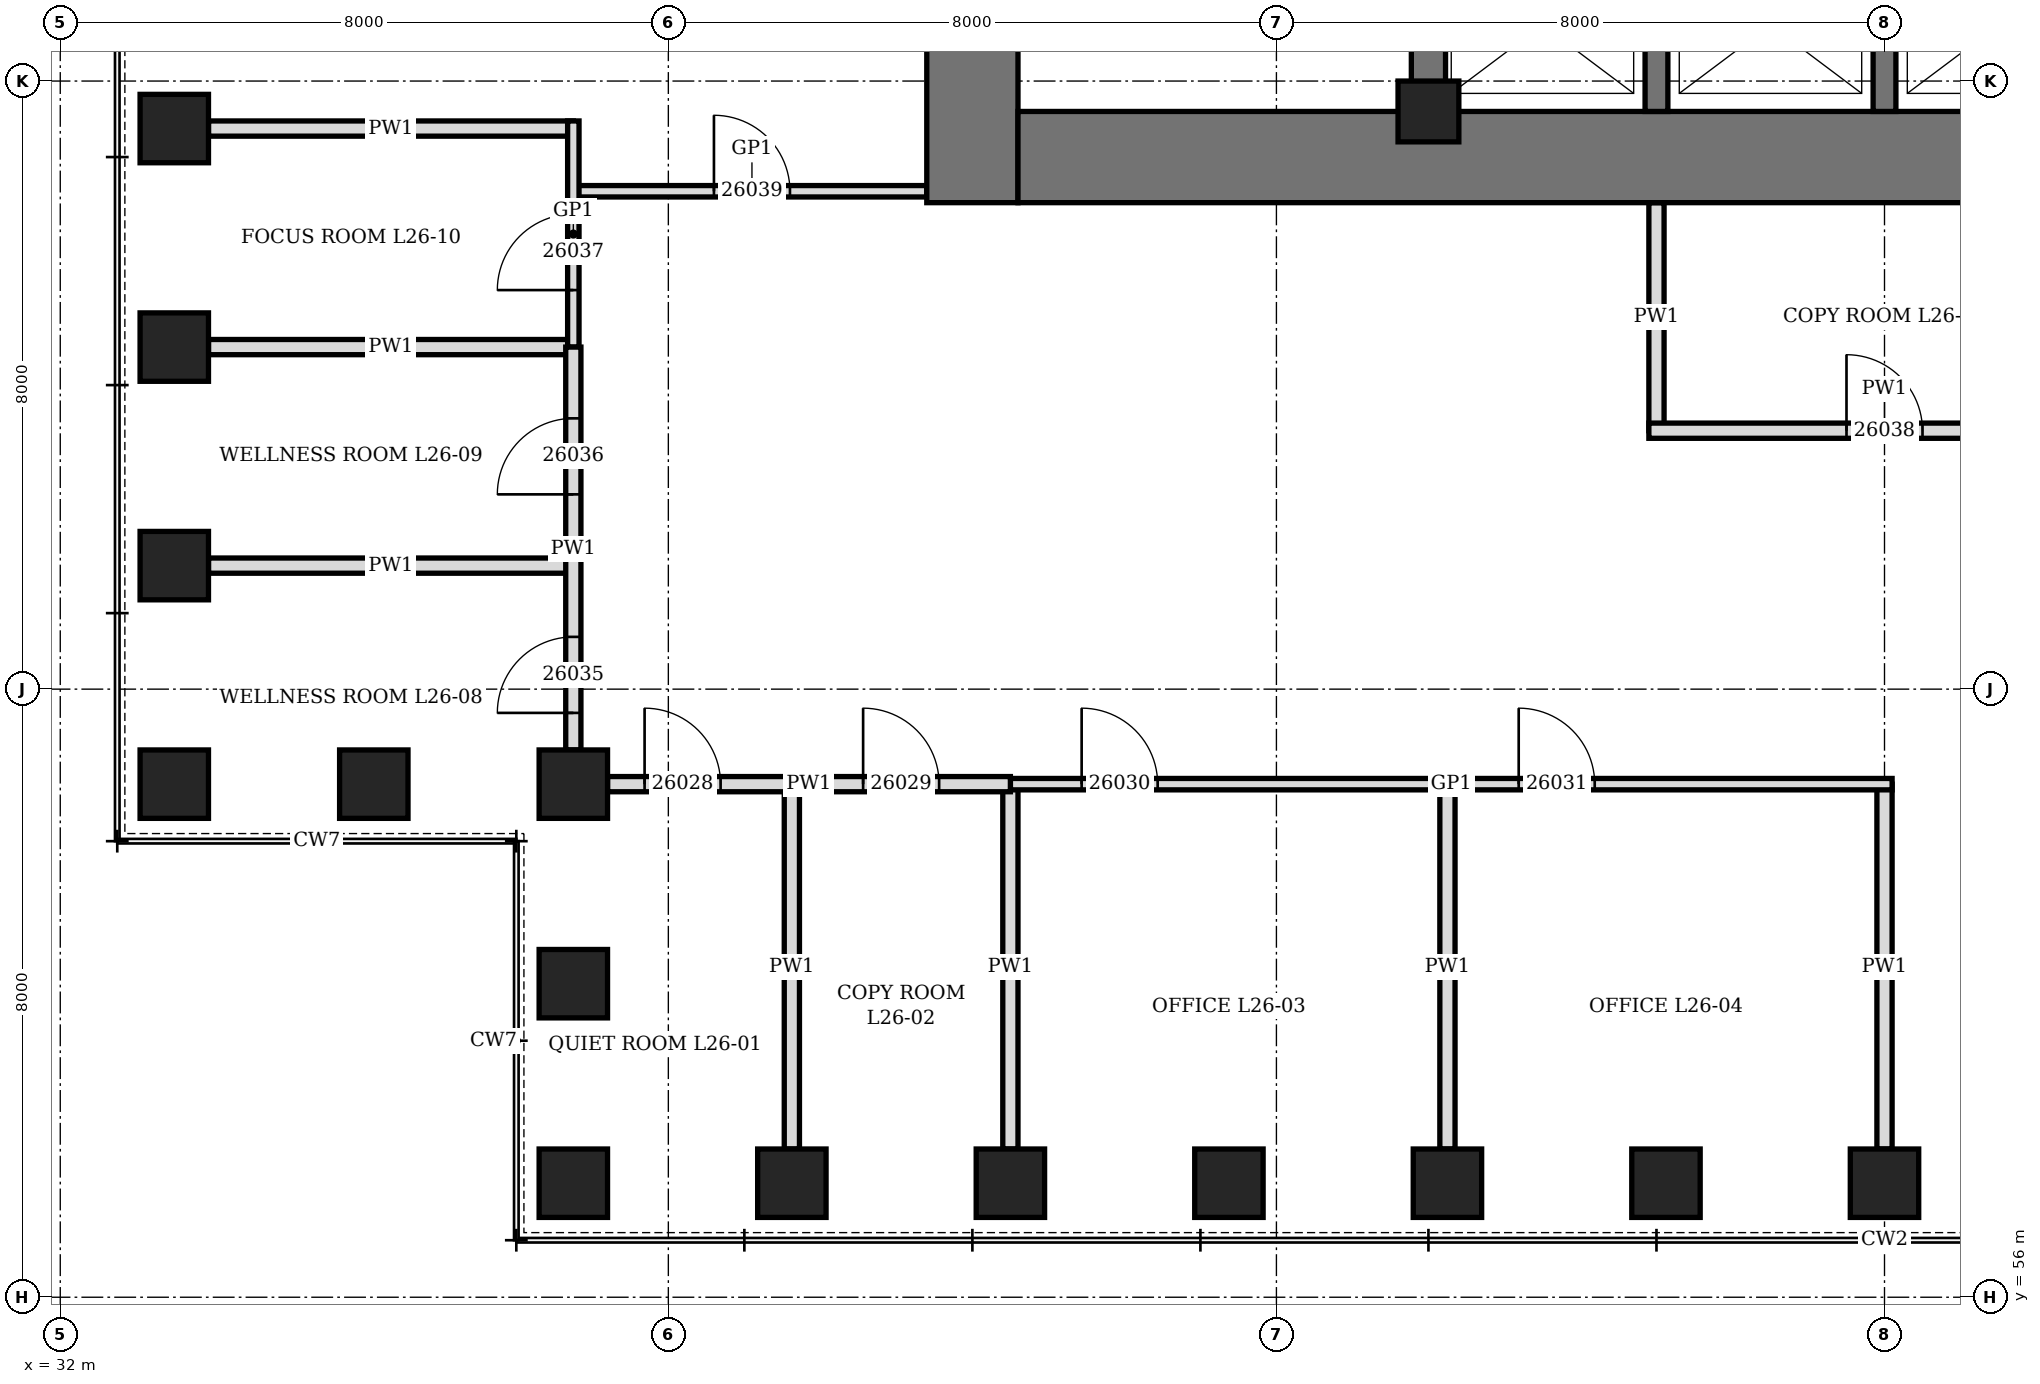
"""IFC4 building model, lengths in metres.
Left out: names, types, materials, properties, quantities, classifications, styles, units other than length and angle.
Written with IfcOpenShell. Run it as: python <this file> out.ifc"""

import sys

from ifc_helpers import new_model, si_unit, direction, frame, frame_2d, origin, origin_2d, place, context, subcontext, project, spatial, rectangle, hollow_rectangle, extrude, element, fill, save


model = new_model("IFC4")
c1 = context("Model", 3, precision=1e-05, world=origin(), true_north=direction((0.0, 1.0)))
c2 = subcontext(c1, "Body", "Model", "MODEL_VIEW")
j1 = project(units=[si_unit("LENGTHUNIT", "METRE"), si_unit("PLANEANGLEUNIT", "RADIAN")], contexts=[c1])
p1 = place(None, origin())
s1 = spatial("IfcSite", under=j1, at=p1, CompositionType="ELEMENT")
p2 = place(p1, origin())
s2 = spatial("IfcBuilding", under=s1, at=p2, CompositionType="ELEMENT")
p3 = place(p2, frame((0.0, 0.0, 120.7)))
s3 = spatial("IfcBuildingStorey", under=s2, at=p3, CompositionType="ELEMENT", Elevation=120.7)
for number, where, z_axis, x_axis in (
    (1, (38.75, 57.5, 0.0), (0.0, 0.0, 1.0), (1.0, 0.0, 0.0)),
    (2, (41.625, 57.5, 0.0), (0.0, 0.0, 1.0), (1.0, 0.0, 0.0)),
    (3, (44.5, 57.5, 0.0), (0.0, 0.0, 1.0), (1.0, 0.0, 0.0)),
    (4, (47.375, 57.5, 0.0), (0.0, 0.0, 1.0), (1.0, 0.0, 0.0)),
    (5, (50.25, 57.5, 0.0), (0.0, 0.0, 1.0), (1.0, 0.0, 0.0)),
    (6, (53.125, 57.5, 0.0), (0.0, 0.0, 1.0), (1.0, 0.0, 0.0)),
    (7, (56.0, 57.5, 0.0), (0.0, 0.0, 1.0), (1.0, 0.0, 0.0)),
    (8, (33.5, 71.375, 0.0), (0.0, 0.0, 1.0), (0.0, 1.0, 0.0)),
    (9, (33.5, 68.5, 0.0), (0.0, 0.0, 1.0), (0.0, 1.0, 0.0)),
    (10, (33.5, 65.625, 0.0), (0.0, 0.0, 1.0), (0.0, 1.0, 0.0)),
    (11, (33.5, 62.75, 0.0), (0.0, 0.0, 1.0), (1.0, 0.0, 0.0)),
    (12, (36.125, 62.75, 0.0), (0.0, 0.0, 1.0), (1.0, 0.0, 0.0)),
    (13, (38.75, 62.75, 0.0), (0.0, 0.0, 1.0), (0.0, 1.0, 0.0)),
    (14, (38.75, 60.125, 0.0), (0.0, 0.0, 1.0), (0.0, 1.0, 0.0)),
):
    element("IfcColumn", number, at=place(p3, frame(where, z_axis=z_axis, x_axis=x_axis)), inside=s3, PredefinedType="COLUMN", context=c2, shape_type="SweptSolid", body=[
        extrude(hollow_rectangle(XDim=0.9, YDim=0.9, WallThickness=0.15, at=origin_2d()), origin(), (0.0, 0.0, 1.0), 4.2),
    ])
p4 = place(p3, frame((44.0, 70.4, 0.0), z_axis=(0.0, 0.0, 1.0), x_axis=(0.0, 1.0, 0.0)))
e15 = element("IfcWall", 15, at=p4, inside=s3, PredefinedType="SHEAR", context=c2, shape_type="SweptSolid", body=[
    extrude(rectangle(XDim=19.2, YDim=1.2, at=frame_2d((9.6, 0.0))), origin(), (0.0, 0.0, 1.0), 4.2),
])
p5 = place(p4, frame((8.6, 0.0, 0.0)))
e16 = element("IfcOpeningElement", 16, at=p5, cuts=e15, PredefinedType="OPENING", context=c2, shape_type="SweptSolid", body=[
    extrude(rectangle(XDim=2.0, YDim=2.4, at=frame_2d((1.0, 1.2))), frame((0.0, 0.61, 0.0), z_axis=(0.0, -1.0, 0.0), x_axis=(1.0, 0.0, 0.0)), (0.0, 0.0, 1.0), 1.22),
])
p6 = place(p3, frame((44.6, 71.0, 0.0), z_axis=(0.0, 0.0, 1.0), x_axis=(1.0, 0.0, 0.0)))
e17 = element("IfcWall", 17, at=p6, inside=s3, PredefinedType="SHEAR", context=c2, shape_type="SweptSolid", body=[
    extrude(rectangle(XDim=22.8, YDim=1.2, at=frame_2d((11.4, 0.0))), origin(), (0.0, 0.0, 1.0), 4.2),
])
p7 = place(p3, frame((50.0, 71.6, 0.0), z_axis=(0.0, 0.0, 1.0), x_axis=(0.0, 1.0, 0.0)))
e18 = element("IfcWall", 18, at=p7, inside=s3, PredefinedType="SHEAR", context=c2, shape_type="SweptSolid", body=[
    extrude(rectangle(XDim=16.8, YDim=0.45, at=frame_2d((8.4, 0.0))), origin(), (0.0, 0.0, 1.0), 4.2),
])
p8 = place(p7, frame((7.5, 0.0, 0.0)))
e19 = element("IfcOpeningElement", 19, at=p8, cuts=e18, PredefinedType="OPENING", context=c2, shape_type="SweptSolid", body=[
    extrude(rectangle(XDim=1.8, YDim=2.4, at=frame_2d((0.9, 1.2))), frame((0.0, 0.235, 0.0), z_axis=(0.0, -1.0, 0.0), x_axis=(1.0, 0.0, 0.0)), (0.0, 0.0, 1.0), 0.47),
])
for number, where, z_axis, x_axis in (
    (20, (53.0, 71.6, 0.0), (0.0, 0.0, 1.0), (0.0, 1.0, 0.0)),
    (21, (56.0, 71.6, 0.0), (0.0, 0.0, 1.0), (0.0, 1.0, 0.0)),
):
    element("IfcWall", number, at=place(p3, frame(where, z_axis=z_axis, x_axis=x_axis)), inside=s3, PredefinedType="SHEAR", context=c2, shape_type="SweptSolid", body=[
        extrude(rectangle(XDim=2.25, YDim=0.3, at=frame_2d((1.125, 0.0))), origin(), (0.0, 0.0, 1.0), 4.2),
    ])
p9 = place(p3, frame((50.0, 71.6, 0.0), z_axis=(0.0, 0.0, 1.0), x_axis=(1.0, 0.0, 0.0)))
e22 = element("IfcColumn", 22, at=p9, inside=s3, PredefinedType="COLUMN", context=c2, shape_type="SweptSolid", body=[
    extrude(hollow_rectangle(XDim=0.8, YDim=0.8, WallThickness=0.1, at=origin_2d()), origin(), (0.0, 0.0, 1.0), 4.2),
])
p10 = place(p3, frame((41.625, 57.95, 0.0), z_axis=(0.0, 0.0, 1.0), x_axis=(0.0, 1.0, 0.0)))
e23 = element("IfcWall", 23, at=p10, inside=s3, PredefinedType="PARTITIONING", context=c2, shape_type="SweptSolid", body=[
    extrude(rectangle(XDim=4.8, YDim=0.2, at=frame_2d((2.4, 0.0))), origin(), (0.0, 0.0, 1.0), 3.428),
])
p11 = place(p3, frame((44.5, 57.95, 0.0), z_axis=(0.0, 0.0, 1.0), x_axis=(0.0, 1.0, 0.0)))
e24 = element("IfcWall", 24, at=p11, inside=s3, PredefinedType="PARTITIONING", context=c2, shape_type="SweptSolid", body=[
    extrude(rectangle(XDim=4.8, YDim=0.2, at=frame_2d((2.4, 0.0))), origin(), (0.0, 0.0, 1.0), 2.74),
])
for number, where, z_axis, x_axis in (
    (25, (50.25, 57.95, 0.0), (0.0, 0.0, 1.0), (0.0, 1.0, 0.0)),
    (26, (56.0, 57.95, 0.0), (0.0, 0.0, 1.0), (0.0, 1.0, 0.0)),
):
    element("IfcWall", number, at=place(p3, frame(where, z_axis=z_axis, x_axis=x_axis)), inside=s3, PredefinedType="PARTITIONING", context=c2, shape_type="SweptSolid", body=[
        extrude(rectangle(XDim=4.8, YDim=0.2, at=frame_2d((2.4, 0.0))), origin(), (0.0, 0.0, 1.0), 3.278),
    ])
for number, where, z_axis, x_axis in (
    (27, (33.95, 65.625, 0.0), (0.0, 0.0, 1.0), (1.0, 0.0, 0.0)),
    (28, (33.95, 68.5, 0.0), (0.0, 0.0, 1.0), (1.0, 0.0, 0.0)),
    (29, (33.95, 71.375, 0.0), (0.0, 0.0, 1.0), (1.0, 0.0, 0.0)),
):
    element("IfcWall", number, at=place(p3, frame(where, z_axis=z_axis, x_axis=x_axis)), inside=s3, PredefinedType="PARTITIONING", context=c2, shape_type="SweptSolid", body=[
        extrude(rectangle(XDim=4.8, YDim=0.2, at=frame_2d((2.4, 0.0))), origin(), (0.0, 0.0, 1.0), 3.428),
    ])
p12 = place(p3, frame((53.0, 67.4, 0.0), z_axis=(0.0, 0.0, 1.0), x_axis=(0.0, 1.0, 0.0)))
e30 = element("IfcWall", 30, at=p12, inside=s3, PredefinedType="PARTITIONING", context=c2, shape_type="SweptSolid", body=[
    extrude(rectangle(XDim=3.0, YDim=0.2, at=frame_2d((1.5, 0.0))), origin(), (0.0, 0.0, 1.0), 3.278),
])
p13 = place(p3, frame((44.5, 62.75, 0.0), z_axis=(0.0, 0.0, 1.0), x_axis=(1.0, 0.0, 0.0)))
e31 = element("IfcWall", 31, at=p13, inside=s3, PredefinedType="PARTITIONING", context=c2, shape_type="SweptSolid", body=[
    extrude(rectangle(XDim=11.6, YDim=0.15, at=frame_2d((5.8, 0.0))), origin(), (0.0, 0.0, 1.0), 4.04),
])
p14 = place(p13, frame((0.938, 0.0, 0.0)))
e32 = element("IfcOpeningElement", 32, at=p14, cuts=e31, PredefinedType="OPENING", context=c2, shape_type="SweptSolid", body=[
    extrude(rectangle(XDim=1.0, YDim=2.1, at=frame_2d((0.5, 1.05))), frame((0.0, 0.085, 0.0), z_axis=(0.0, -1.0, 0.0), x_axis=(1.0, 0.0, 0.0)), (0.0, 0.0, 1.0), 0.17),
])
p15 = place(p13, frame((6.688, 0.0, 0.0)))
e33 = element("IfcOpeningElement", 33, at=p15, cuts=e31, PredefinedType="OPENING", context=c2, shape_type="SweptSolid", body=[
    extrude(rectangle(XDim=1.0, YDim=2.1, at=frame_2d((0.5, 1.05))), frame((0.0, 0.085, 0.0), z_axis=(0.0, -1.0, 0.0), x_axis=(1.0, 0.0, 0.0)), (0.0, 0.0, 1.0), 0.17),
])
p16 = place(p3, frame((39.2, 62.75, 0.0), z_axis=(0.0, 0.0, 1.0), x_axis=(1.0, 0.0, 0.0)))
e34 = element("IfcWall", 34, at=p16, inside=s3, PredefinedType="PARTITIONING", context=c2, shape_type="SweptSolid", body=[
    extrude(rectangle(XDim=5.3, YDim=0.2, at=frame_2d((2.65, 0.0))), origin(), (0.0, 0.0, 1.0), 4.04),
])
p17 = place(p16, frame((0.488, 0.0, 0.0)))
e35 = element("IfcOpeningElement", 35, at=p17, cuts=e34, PredefinedType="OPENING", context=c2, shape_type="SweptSolid", body=[
    extrude(rectangle(XDim=1.0, YDim=2.1, at=frame_2d((0.5, 1.05))), frame((0.0, 0.11, 0.0), z_axis=(0.0, -1.0, 0.0), x_axis=(1.0, 0.0, 0.0)), (0.0, 0.0, 1.0), 0.22),
])
p18 = place(p16, frame((3.363, 0.0, 0.0)))
e36 = element("IfcOpeningElement", 36, at=p18, cuts=e34, PredefinedType="OPENING", context=c2, shape_type="SweptSolid", body=[
    extrude(rectangle(XDim=1.0, YDim=2.1, at=frame_2d((0.5, 1.05))), frame((0.0, 0.11, 0.0), z_axis=(0.0, -1.0, 0.0), x_axis=(1.0, 0.0, 0.0)), (0.0, 0.0, 1.0), 0.22),
])
p19 = place(p3, frame((52.9, 67.4, 0.0), z_axis=(0.0, 0.0, 1.0), x_axis=(1.0, 0.0, 0.0)))
e37 = element("IfcWall", 37, at=p19, inside=s3, PredefinedType="PARTITIONING", context=c2, shape_type="SweptSolid", body=[
    extrude(rectangle(XDim=6.2, YDim=0.2, at=frame_2d((3.1, 0.0))), origin(), (0.0, 0.0, 1.0), 4.04),
])
p20 = place(p19, frame((2.6, 0.0, 0.0)))
e38 = element("IfcOpeningElement", 38, at=p20, cuts=e37, PredefinedType="OPENING", context=c2, shape_type="SweptSolid", body=[
    extrude(rectangle(XDim=1.0, YDim=2.1, at=frame_2d((0.5, 1.05))), frame((0.0, 0.11, 0.0), z_axis=(0.0, -1.0, 0.0), x_axis=(1.0, 0.0, 0.0)), (0.0, 0.0, 1.0), 0.22),
])
p21 = place(p3, frame((38.8, 70.55, 0.0), z_axis=(0.0, 0.0, 1.0), x_axis=(1.0, 0.0, 0.0)))
e39 = element("IfcWall", 39, at=p21, inside=s3, PredefinedType="PARTITIONING", context=c2, shape_type="SweptSolid", body=[
    extrude(rectangle(XDim=4.6, YDim=0.15, at=frame_2d((2.3, 0.0))), origin(), (0.0, 0.0, 1.0), 4.04),
])
p22 = place(p21, frame((1.8, 0.0, 0.0)))
e40 = element("IfcOpeningElement", 40, at=p22, cuts=e39, PredefinedType="OPENING", context=c2, shape_type="SweptSolid", body=[
    extrude(rectangle(XDim=1.0, YDim=2.4, at=frame_2d((0.5, 1.2))), frame((0.0, 0.085, 0.0), z_axis=(0.0, -1.0, 0.0), x_axis=(1.0, 0.0, 0.0)), (0.0, 0.0, 1.0), 0.17),
])
p23 = place(p3, frame((38.75, 68.5, 0.0), z_axis=(0.0, 0.0, 1.0), x_axis=(0.0, 1.0, 0.0)))
e41 = element("IfcWall", 41, at=p23, inside=s3, PredefinedType="PARTITIONING", context=c2, shape_type="SweptSolid", body=[
    extrude(rectangle(XDim=2.975, YDim=0.15, at=frame_2d((1.488, 0.0))), origin(), (0.0, 0.0, 1.0), 4.04),
])
p24 = place(p23, frame((0.75, 0.0, 0.0)))
e42 = element("IfcOpeningElement", 42, at=p24, cuts=e41, PredefinedType="OPENING", context=c2, shape_type="SweptSolid", body=[
    extrude(rectangle(XDim=1.0, YDim=2.4, at=frame_2d((0.5, 1.2))), frame((0.0, 0.085, 0.0), z_axis=(0.0, -1.0, 0.0), x_axis=(1.0, 0.0, 0.0)), (0.0, 0.0, 1.0), 0.17),
])
p25 = place(p3, frame((38.75, 63.2, 0.0), z_axis=(0.0, 0.0, 1.0), x_axis=(0.0, 1.0, 0.0)))
e43 = element("IfcWall", 43, at=p25, inside=s3, PredefinedType="PARTITIONING", context=c2, shape_type="SweptSolid", body=[
    extrude(rectangle(XDim=5.3, YDim=0.2, at=frame_2d((2.65, 0.0))), origin(), (0.0, 0.0, 1.0), 4.04),
])
p26 = place(p25, frame((0.488, 0.0, 0.0)))
e44 = element("IfcOpeningElement", 44, at=p26, cuts=e43, PredefinedType="OPENING", context=c2, shape_type="SweptSolid", body=[
    extrude(rectangle(XDim=1.0, YDim=2.1, at=frame_2d((0.5, 1.05))), frame((0.0, 0.11, 0.0), z_axis=(0.0, -1.0, 0.0), x_axis=(1.0, 0.0, 0.0)), (0.0, 0.0, 1.0), 0.22),
])
p27 = place(p25, frame((3.363, 0.0, 0.0)))
e45 = element("IfcOpeningElement", 45, at=p27, cuts=e43, PredefinedType="OPENING", context=c2, shape_type="SweptSolid", body=[
    extrude(rectangle(XDim=1.0, YDim=2.1, at=frame_2d((0.5, 1.05))), frame((0.0, 0.11, 0.0), z_axis=(0.0, -1.0, 0.0), x_axis=(1.0, 0.0, 0.0)), (0.0, 0.0, 1.0), 0.22),
])
p28 = place(p17, origin())
e46 = element("IfcDoor", 46, at=p28, inside=s3, OperationType="SINGLE_SWING_LEFT", PredefinedType="DOOR", context=c2, shape_type="SweptSolid", body=[
    extrude(rectangle(XDim=1.0, YDim=2.1, at=frame_2d((0.5, 1.05))), frame((0.0, 0.1, 0.0), z_axis=(0.0, -1.0, 0.0), x_axis=(1.0, 0.0, 0.0)), (0.0, 0.0, 1.0), 0.199),
])
fill(e35, e46)
p29 = place(p18, origin())
e47 = element("IfcDoor", 47, at=p29, inside=s3, OperationType="SINGLE_SWING_LEFT", PredefinedType="DOOR", context=c2, shape_type="SweptSolid", body=[
    extrude(rectangle(XDim=1.0, YDim=2.1, at=frame_2d((0.5, 1.05))), frame((0.0, 0.1, 0.0), z_axis=(0.0, -1.0, 0.0), x_axis=(1.0, 0.0, 0.0)), (0.0, 0.0, 1.0), 0.199),
])
fill(e36, e47)
p30 = place(p14, origin())
e48 = element("IfcDoor", 48, at=p30, inside=s3, OperationType="SINGLE_SWING_LEFT", PredefinedType="DOOR", context=c2, shape_type="SweptSolid", body=[
    extrude(rectangle(XDim=1.0, YDim=2.1, at=frame_2d((0.5, 1.05))), frame((0.0, 0.075, 0.0), z_axis=(0.0, -1.0, 0.0), x_axis=(1.0, 0.0, 0.0)), (0.0, 0.0, 1.0), 0.149),
])
fill(e32, e48)
p31 = place(p15, origin())
e49 = element("IfcDoor", 49, at=p31, inside=s3, OperationType="SINGLE_SWING_LEFT", PredefinedType="DOOR", context=c2, shape_type="SweptSolid", body=[
    extrude(rectangle(XDim=1.0, YDim=2.1, at=frame_2d((0.5, 1.05))), frame((0.0, 0.075, 0.0), z_axis=(0.0, -1.0, 0.0), x_axis=(1.0, 0.0, 0.0)), (0.0, 0.0, 1.0), 0.149),
])
fill(e33, e49)
p32 = place(p26, origin())
e50 = element("IfcDoor", 50, at=p32, inside=s3, OperationType="SINGLE_SWING_LEFT", PredefinedType="DOOR", context=c2, shape_type="SweptSolid", body=[
    extrude(rectangle(XDim=1.0, YDim=2.1, at=frame_2d((0.5, 1.05))), frame((0.0, 0.1, 0.0), z_axis=(0.0, -1.0, 0.0), x_axis=(1.0, 0.0, 0.0)), (0.0, 0.0, 1.0), 0.199),
])
fill(e44, e50)
p33 = place(p27, origin())
e51 = element("IfcDoor", 51, at=p33, inside=s3, OperationType="SINGLE_SWING_LEFT", PredefinedType="DOOR", context=c2, shape_type="SweptSolid", body=[
    extrude(rectangle(XDim=1.0, YDim=2.1, at=frame_2d((0.5, 1.05))), frame((0.0, 0.1, 0.0), z_axis=(0.0, -1.0, 0.0), x_axis=(1.0, 0.0, 0.0)), (0.0, 0.0, 1.0), 0.199),
])
fill(e45, e51)
p34 = place(p24, origin())
e52 = element("IfcDoor", 52, at=p34, inside=s3, OperationType="SINGLE_SWING_RIGHT", PredefinedType="DOOR", context=c2, shape_type="SweptSolid", body=[
    extrude(rectangle(XDim=1.0, YDim=2.4, at=frame_2d((0.5, 1.2))), frame((0.0, 0.075, 0.0), z_axis=(0.0, -1.0, 0.0), x_axis=(1.0, 0.0, 0.0)), (0.0, 0.0, 1.0), 0.149),
])
fill(e42, e52)
p35 = place(p20, origin())
e53 = element("IfcDoor", 53, at=p35, inside=s3, OperationType="SINGLE_SWING_LEFT", PredefinedType="DOOR", context=c2, shape_type="SweptSolid", body=[
    extrude(rectangle(XDim=1.0, YDim=2.1, at=frame_2d((0.5, 1.05))), frame((0.0, 0.1, 0.0), z_axis=(0.0, -1.0, 0.0), x_axis=(1.0, 0.0, 0.0)), (0.0, 0.0, 1.0), 0.199),
])
fill(e38, e53)
p36 = place(p22, origin())
e54 = element("IfcDoor", 54, at=p36, inside=s3, OperationType="SINGLE_SWING_RIGHT", PredefinedType="DOOR", context=c2, shape_type="SweptSolid", body=[
    extrude(rectangle(XDim=1.0, YDim=2.4, at=frame_2d((0.5, 1.2))), frame((0.0, 0.075, 0.0), z_axis=(0.0, -1.0, 0.0), x_axis=(1.0, 0.0, 0.0)), (0.0, 0.0, 1.0), 0.149),
])
fill(e40, e54)
save(model, sys.argv[1])
